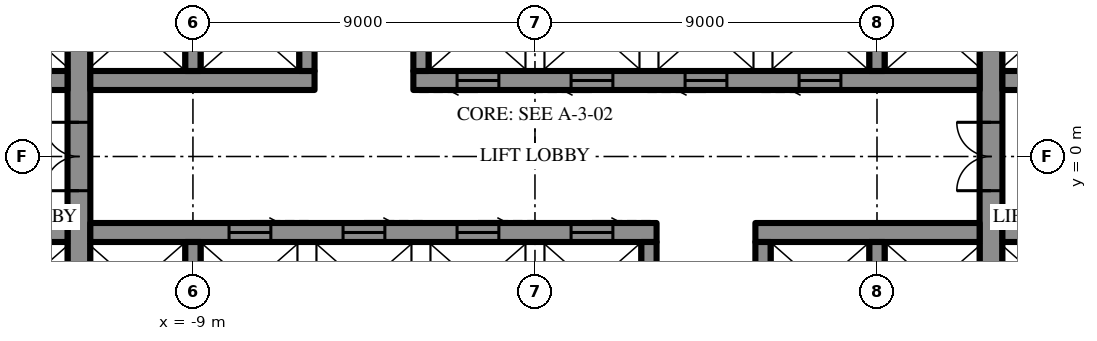
"""IFC4 building model, lengths in metres.
Left out: names, types, materials, properties, quantities, classifications, styles, units other than length and angle.
Written with IfcOpenShell. Run it as: python <this file> out.ifc"""

import sys

from ifc_helpers import new_model, si_unit, direction, frame, frame_2d, origin, place, context, subcontext, project, spatial, rectangle, extrude, element, fill, save


model = new_model("IFC4")
c1 = context("Model", 3, precision=1e-05, world=origin(), true_north=direction((0.0, 1.0)))
c2 = subcontext(c1, "Body", "Model", "MODEL_VIEW")
j1 = project(units=[si_unit("LENGTHUNIT", "METRE"), si_unit("PLANEANGLEUNIT", "RADIAN")], contexts=[c1])
p1 = place(None, origin())
s1 = spatial("IfcSite", under=j1, at=p1, CompositionType="ELEMENT")
p2 = place(p1, origin())
s2 = spatial("IfcBuilding", under=s1, at=p2, CompositionType="ELEMENT")
p3 = place(p2, frame((0.0, 0.0, 161.5)))
s3 = spatial("IfcBuildingStorey", under=s2, at=p3, CompositionType="ELEMENT", Elevation=161.5)
p4 = place(p3, frame((12.0, -10.7, 0.0), z_axis=(0.0, 0.0, 1.0), x_axis=(0.0, 1.0, 0.0)))
e1 = element("IfcWall", 1, at=p4, inside=s3, PredefinedType="SHEAR", context=c2, shape_type="SweptSolid", body=[
    extrude(rectangle(XDim=21.4, YDim=0.6, at=frame_2d((10.7, 0.0))), origin(), (0.0, 0.0, 1.0), 4.2),
])
p5 = place(p4, frame((9.8, 0.0, 0.0)))
e2 = element("IfcOpeningElement", 2, at=p5, cuts=e1, PredefinedType="OPENING", context=c2, shape_type="SweptSolid", body=[
    extrude(rectangle(XDim=1.8, YDim=2.4, at=frame_2d((0.9, 1.2))), frame((0.0, 0.31, 0.0), z_axis=(0.0, -1.0, 0.0), x_axis=(1.0, 0.0, 0.0)), (0.0, 0.0, 1.0), 0.62),
])
p6 = place(p3, frame((-12.0, -10.7, 0.0), z_axis=(0.0, 0.0, 1.0), x_axis=(0.0, 1.0, 0.0)))
e3 = element("IfcWall", 3, at=p6, inside=s3, PredefinedType="SHEAR", context=c2, shape_type="SweptSolid", body=[
    extrude(rectangle(XDim=21.4, YDim=0.6, at=frame_2d((10.7, 0.0))), origin(), (0.0, 0.0, 1.0), 4.2),
])
p7 = place(p6, frame((9.8, 0.0, 0.0)))
e4 = element("IfcOpeningElement", 4, at=p7, cuts=e3, PredefinedType="OPENING", context=c2, shape_type="SweptSolid", body=[
    extrude(rectangle(XDim=1.8, YDim=2.4, at=frame_2d((0.9, 1.2))), frame((0.0, 0.31, 0.0), z_axis=(0.0, -1.0, 0.0), x_axis=(1.0, 0.0, 0.0)), (0.0, 0.0, 1.0), 0.62),
])
p8 = place(p3, frame((-14.7, 2.0, 0.0), z_axis=(0.0, 0.0, 1.0), x_axis=(1.0, 0.0, 0.0)))
e5 = element("IfcWall", 5, at=p8, inside=s3, PredefinedType="SHEAR", context=c2, shape_type="SweptSolid", body=[
    extrude(rectangle(XDim=2.4, YDim=0.5, at=frame_2d((1.2, 0.0))), origin(), (0.0, 0.0, 1.0), 4.2),
])
p9 = place(p3, frame((-11.7, 2.0, 0.0), z_axis=(0.0, 0.0, 1.0), x_axis=(1.0, 0.0, 0.0)))
e6 = element("IfcWall", 6, at=p9, inside=s3, PredefinedType="SHEAR", context=c2, shape_type="SweptSolid", body=[
    extrude(rectangle(XDim=5.9, YDim=0.5, at=frame_2d((2.95, 0.0))), origin(), (0.0, 0.0, 1.0), 4.2),
])
p10 = place(p3, frame((-3.2, 2.0, 0.0), z_axis=(0.0, 0.0, 1.0), x_axis=(1.0, 0.0, 0.0)))
e7 = element("IfcWall", 7, at=p10, inside=s3, PredefinedType="SHEAR", context=c2, shape_type="SweptSolid", body=[
    extrude(rectangle(XDim=14.9, YDim=0.5, at=frame_2d((7.45, 0.0))), origin(), (0.0, 0.0, 1.0), 4.2),
])
p11 = place(p10, frame((1.15, 0.0, 0.0)))
e8 = element("IfcOpeningElement", 8, at=p11, cuts=e7, PredefinedType="OPENING", context=c2, shape_type="SweptSolid", body=[
    extrude(rectangle(XDim=1.1, YDim=2.2, at=frame_2d((0.55, 1.1))), frame((0.0, 0.26, 0.0), z_axis=(0.0, -1.0, 0.0), x_axis=(1.0, 0.0, 0.0)), (0.0, 0.0, 1.0), 0.52),
])
p12 = place(p10, frame((4.15, 0.0, 0.0)))
e9 = element("IfcOpeningElement", 9, at=p12, cuts=e7, PredefinedType="OPENING", context=c2, shape_type="SweptSolid", body=[
    extrude(rectangle(XDim=1.1, YDim=2.2, at=frame_2d((0.55, 1.1))), frame((0.0, 0.26, 0.0), z_axis=(0.0, -1.0, 0.0), x_axis=(1.0, 0.0, 0.0)), (0.0, 0.0, 1.0), 0.52),
])
p13 = place(p10, frame((7.15, 0.0, 0.0)))
e10 = element("IfcOpeningElement", 10, at=p13, cuts=e7, PredefinedType="OPENING", context=c2, shape_type="SweptSolid", body=[
    extrude(rectangle(XDim=1.1, YDim=2.2, at=frame_2d((0.55, 1.1))), frame((0.0, 0.26, 0.0), z_axis=(0.0, -1.0, 0.0), x_axis=(1.0, 0.0, 0.0)), (0.0, 0.0, 1.0), 0.52),
])
p14 = place(p10, frame((10.15, 0.0, 0.0)))
e11 = element("IfcOpeningElement", 11, at=p14, cuts=e7, PredefinedType="OPENING", context=c2, shape_type="SweptSolid", body=[
    extrude(rectangle(XDim=1.1, YDim=2.2, at=frame_2d((0.55, 1.1))), frame((0.0, 0.26, 0.0), z_axis=(0.0, -1.0, 0.0), x_axis=(1.0, 0.0, 0.0)), (0.0, 0.0, 1.0), 0.52),
])
p15 = place(p3, frame((12.3, 2.0, 0.0), z_axis=(0.0, 0.0, 1.0), x_axis=(1.0, 0.0, 0.0)))
e12 = element("IfcWall", 12, at=p15, inside=s3, PredefinedType="SHEAR", context=c2, shape_type="SweptSolid", body=[
    extrude(rectangle(XDim=2.4, YDim=0.5, at=frame_2d((1.2, 0.0))), origin(), (0.0, 0.0, 1.0), 4.2),
])
for number, where, z_axis, x_axis in (
    (13, (-9.0, 2.25, 0.0), (0.0, 0.0, 1.0), (0.0, 1.0, 0.0)),
    (14, (-6.0, 2.25, 0.0), (0.0, 0.0, 1.0), (0.0, 1.0, 0.0)),
    (15, (-3.0, 2.25, 0.0), (0.0, 0.0, 1.0), (0.0, 1.0, 0.0)),
    (16, (9.0, 2.25, 0.0), (0.0, 0.0, 1.0), (0.0, 1.0, 0.0)),
):
    element("IfcWall", number, at=place(p3, frame(where, z_axis=z_axis, x_axis=x_axis)), inside=s3, PredefinedType="SHEAR", context=c2, shape_type="SweptSolid", body=[
        extrude(rectangle(XDim=2.3, YDim=0.4, at=frame_2d((1.15, 0.0))), origin(), (0.0, 0.0, 1.0), 4.2),
    ])
p16 = place(p3, frame((14.7, -2.0, 0.0), z_axis=(0.0, 0.0, 1.0), x_axis=(-1.0, 0.0, 0.0)))
e17 = element("IfcWall", 17, at=p16, inside=s3, PredefinedType="SHEAR", context=c2, shape_type="SweptSolid", body=[
    extrude(rectangle(XDim=2.4, YDim=0.5, at=frame_2d((1.2, 0.0))), origin(), (0.0, 0.0, 1.0), 4.2),
])
p17 = place(p3, frame((11.7, -2.0, 0.0), z_axis=(0.0, 0.0, 1.0), x_axis=(-1.0, 0.0, 0.0)))
e18 = element("IfcWall", 18, at=p17, inside=s3, PredefinedType="SHEAR", context=c2, shape_type="SweptSolid", body=[
    extrude(rectangle(XDim=5.9, YDim=0.5, at=frame_2d((2.95, 0.0))), origin(), (0.0, 0.0, 1.0), 4.2),
])
p18 = place(p3, frame((3.2, -2.0, 0.0), z_axis=(0.0, 0.0, 1.0), x_axis=(-1.0, 0.0, 0.0)))
e19 = element("IfcWall", 19, at=p18, inside=s3, PredefinedType="SHEAR", context=c2, shape_type="SweptSolid", body=[
    extrude(rectangle(XDim=14.9, YDim=0.5, at=frame_2d((7.45, 0.0))), origin(), (0.0, 0.0, 1.0), 4.2),
])
p19 = place(p18, frame((1.15, 0.0, 0.0)))
e20 = element("IfcOpeningElement", 20, at=p19, cuts=e19, PredefinedType="OPENING", context=c2, shape_type="SweptSolid", body=[
    extrude(rectangle(XDim=1.1, YDim=2.2, at=frame_2d((0.55, 1.1))), frame((0.0, 0.26, 0.0), z_axis=(0.0, -1.0, 0.0), x_axis=(1.0, 0.0, 0.0)), (0.0, 0.0, 1.0), 0.52),
])
p20 = place(p18, frame((4.15, 0.0, 0.0)))
e21 = element("IfcOpeningElement", 21, at=p20, cuts=e19, PredefinedType="OPENING", context=c2, shape_type="SweptSolid", body=[
    extrude(rectangle(XDim=1.1, YDim=2.2, at=frame_2d((0.55, 1.1))), frame((0.0, 0.26, 0.0), z_axis=(0.0, -1.0, 0.0), x_axis=(1.0, 0.0, 0.0)), (0.0, 0.0, 1.0), 0.52),
])
p21 = place(p18, frame((7.15, 0.0, 0.0)))
e22 = element("IfcOpeningElement", 22, at=p21, cuts=e19, PredefinedType="OPENING", context=c2, shape_type="SweptSolid", body=[
    extrude(rectangle(XDim=1.1, YDim=2.2, at=frame_2d((0.55, 1.1))), frame((0.0, 0.26, 0.0), z_axis=(0.0, -1.0, 0.0), x_axis=(1.0, 0.0, 0.0)), (0.0, 0.0, 1.0), 0.52),
])
p22 = place(p18, frame((10.15, 0.0, 0.0)))
e23 = element("IfcOpeningElement", 23, at=p22, cuts=e19, PredefinedType="OPENING", context=c2, shape_type="SweptSolid", body=[
    extrude(rectangle(XDim=1.1, YDim=2.2, at=frame_2d((0.55, 1.1))), frame((0.0, 0.26, 0.0), z_axis=(0.0, -1.0, 0.0), x_axis=(1.0, 0.0, 0.0)), (0.0, 0.0, 1.0), 0.52),
])
p23 = place(p3, frame((-12.3, -2.0, 0.0), z_axis=(0.0, 0.0, 1.0), x_axis=(-1.0, 0.0, 0.0)))
e24 = element("IfcWall", 24, at=p23, inside=s3, PredefinedType="SHEAR", context=c2, shape_type="SweptSolid", body=[
    extrude(rectangle(XDim=2.4, YDim=0.5, at=frame_2d((1.2, 0.0))), origin(), (0.0, 0.0, 1.0), 4.2),
])
for number, where, z_axis, x_axis in (
    (25, (9.0, -2.25, 0.0), (0.0, 0.0, 1.0), (0.0, -1.0, 0.0)),
    (26, (6.0, -2.25, 0.0), (0.0, 0.0, 1.0), (0.0, -1.0, 0.0)),
    (27, (3.0, -2.25, 0.0), (0.0, 0.0, 1.0), (0.0, -1.0, 0.0)),
    (28, (-9.0, -2.25, 0.0), (0.0, 0.0, 1.0), (0.0, -1.0, 0.0)),
):
    element("IfcWall", number, at=place(p3, frame(where, z_axis=z_axis, x_axis=x_axis)), inside=s3, PredefinedType="SHEAR", context=c2, shape_type="SweptSolid", body=[
        extrude(rectangle(XDim=2.3, YDim=0.4, at=frame_2d((1.15, 0.0))), origin(), (0.0, 0.0, 1.0), 4.2),
    ])
p24 = place(p5, origin())
e29 = element("IfcDoor", 29, at=p24, inside=s3, OperationType="DOUBLE_DOOR_SINGLE_SWING", PredefinedType="DOOR", context=c2, shape_type="SweptSolid", body=[
    extrude(rectangle(XDim=1.8, YDim=2.4, at=frame_2d((0.9, 1.2))), frame((0.0, 0.025, 0.0), z_axis=(0.0, -1.0, 0.0), x_axis=(1.0, 0.0, 0.0)), (0.0, 0.0, 1.0), 0.05),
])
fill(e2, e29)
p25 = place(p7, origin())
e30 = element("IfcDoor", 30, at=p25, inside=s3, OperationType="DOUBLE_DOOR_SINGLE_SWING", PredefinedType="DOOR", context=c2, shape_type="SweptSolid", body=[
    extrude(rectangle(XDim=1.8, YDim=2.4, at=frame_2d((0.9, 1.2))), frame((0.0, 0.025, 0.0), z_axis=(0.0, -1.0, 0.0), x_axis=(1.0, 0.0, 0.0)), (0.0, 0.0, 1.0), 0.05),
])
fill(e4, e30)
p26 = place(p11, frame((1.1, 0.0, 0.0), z_axis=(0.0, 0.0, 1.0), x_axis=(-1.0, 0.0, 0.0)))
e31 = element("IfcDoor", 31, at=p26, inside=s3, OperationType="SLIDING_TO_LEFT", PredefinedType="DOOR", context=c2, shape_type="SweptSolid", body=[
    extrude(rectangle(XDim=1.1, YDim=2.2, at=frame_2d((0.55, 1.1))), frame((0.0, 0.025, 0.0), z_axis=(0.0, -1.0, 0.0), x_axis=(1.0, 0.0, 0.0)), (0.0, 0.0, 1.0), 0.05),
])
fill(e8, e31)
p27 = place(p12, frame((1.1, 0.0, 0.0), z_axis=(0.0, 0.0, 1.0), x_axis=(-1.0, 0.0, 0.0)))
e32 = element("IfcDoor", 32, at=p27, inside=s3, OperationType="SLIDING_TO_LEFT", PredefinedType="DOOR", context=c2, shape_type="SweptSolid", body=[
    extrude(rectangle(XDim=1.1, YDim=2.2, at=frame_2d((0.55, 1.1))), frame((0.0, 0.025, 0.0), z_axis=(0.0, -1.0, 0.0), x_axis=(1.0, 0.0, 0.0)), (0.0, 0.0, 1.0), 0.05),
])
fill(e9, e32)
p28 = place(p13, frame((1.1, 0.0, 0.0), z_axis=(0.0, 0.0, 1.0), x_axis=(-1.0, 0.0, 0.0)))
e33 = element("IfcDoor", 33, at=p28, inside=s3, OperationType="SLIDING_TO_LEFT", PredefinedType="DOOR", context=c2, shape_type="SweptSolid", body=[
    extrude(rectangle(XDim=1.1, YDim=2.2, at=frame_2d((0.55, 1.1))), frame((0.0, 0.025, 0.0), z_axis=(0.0, -1.0, 0.0), x_axis=(1.0, 0.0, 0.0)), (0.0, 0.0, 1.0), 0.05),
])
fill(e10, e33)
p29 = place(p14, frame((1.1, 0.0, 0.0), z_axis=(0.0, 0.0, 1.0), x_axis=(-1.0, 0.0, 0.0)))
e34 = element("IfcDoor", 34, at=p29, inside=s3, OperationType="SLIDING_TO_LEFT", PredefinedType="DOOR", context=c2, shape_type="SweptSolid", body=[
    extrude(rectangle(XDim=1.1, YDim=2.2, at=frame_2d((0.55, 1.1))), frame((0.0, 0.025, 0.0), z_axis=(0.0, -1.0, 0.0), x_axis=(1.0, 0.0, 0.0)), (0.0, 0.0, 1.0), 0.05),
])
fill(e11, e34)
p30 = place(p19, frame((1.1, 0.0, 0.0), z_axis=(0.0, 0.0, 1.0), x_axis=(-1.0, 0.0, 0.0)))
e35 = element("IfcDoor", 35, at=p30, inside=s3, OperationType="SLIDING_TO_LEFT", PredefinedType="DOOR", context=c2, shape_type="SweptSolid", body=[
    extrude(rectangle(XDim=1.1, YDim=2.2, at=frame_2d((0.55, 1.1))), frame((0.0, 0.025, 0.0), z_axis=(0.0, -1.0, 0.0), x_axis=(1.0, 0.0, 0.0)), (0.0, 0.0, 1.0), 0.05),
])
fill(e20, e35)
p31 = place(p20, frame((1.1, 0.0, 0.0), z_axis=(0.0, 0.0, 1.0), x_axis=(-1.0, 0.0, 0.0)))
e36 = element("IfcDoor", 36, at=p31, inside=s3, OperationType="SLIDING_TO_LEFT", PredefinedType="DOOR", context=c2, shape_type="SweptSolid", body=[
    extrude(rectangle(XDim=1.1, YDim=2.2, at=frame_2d((0.55, 1.1))), frame((0.0, 0.025, 0.0), z_axis=(0.0, -1.0, 0.0), x_axis=(1.0, 0.0, 0.0)), (0.0, 0.0, 1.0), 0.05),
])
fill(e21, e36)
p32 = place(p21, frame((1.1, 0.0, 0.0), z_axis=(0.0, 0.0, 1.0), x_axis=(-1.0, 0.0, 0.0)))
e37 = element("IfcDoor", 37, at=p32, inside=s3, OperationType="SLIDING_TO_LEFT", PredefinedType="DOOR", context=c2, shape_type="SweptSolid", body=[
    extrude(rectangle(XDim=1.1, YDim=2.2, at=frame_2d((0.55, 1.1))), frame((0.0, 0.025, 0.0), z_axis=(0.0, -1.0, 0.0), x_axis=(1.0, 0.0, 0.0)), (0.0, 0.0, 1.0), 0.05),
])
fill(e22, e37)
p33 = place(p22, frame((1.1, 0.0, 0.0), z_axis=(0.0, 0.0, 1.0), x_axis=(-1.0, 0.0, 0.0)))
e38 = element("IfcDoor", 38, at=p33, inside=s3, OperationType="SLIDING_TO_LEFT", PredefinedType="DOOR", context=c2, shape_type="SweptSolid", body=[
    extrude(rectangle(XDim=1.1, YDim=2.2, at=frame_2d((0.55, 1.1))), frame((0.0, 0.025, 0.0), z_axis=(0.0, -1.0, 0.0), x_axis=(1.0, 0.0, 0.0)), (0.0, 0.0, 1.0), 0.05),
])
fill(e23, e38)
save(model, sys.argv[1])
